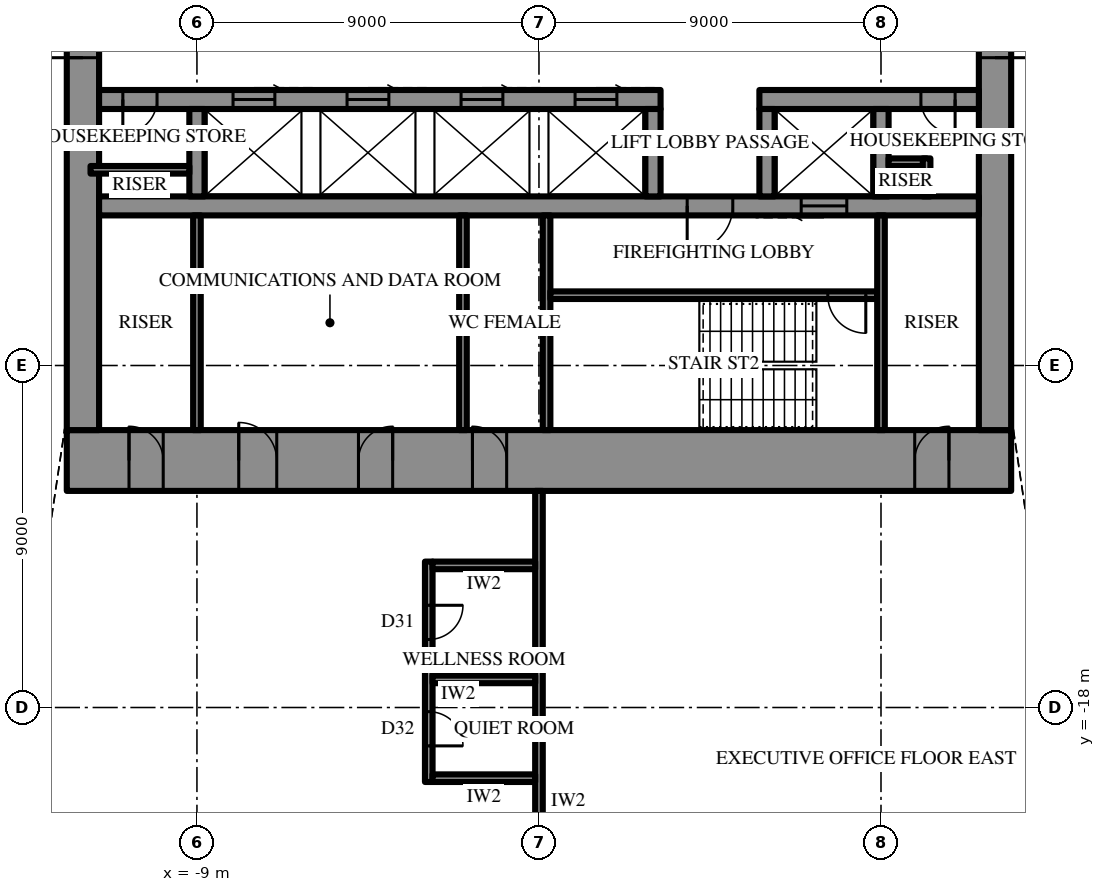
"""IFC4 building model, lengths in metres.
Left out: names, types, materials, properties, quantities, classifications, styles, units other than length and angle.
Written with IfcOpenShell. Run it as: python <this file> out.ifc"""

import sys

from ifc_helpers import new_model, si_unit, direction, frame, frame_2d, origin, place, context, subcontext, project, spatial, rectangle, extrude, element, fill, save


model = new_model("IFC4")
c1 = context("Model", 3, precision=1e-05, world=origin(), true_north=direction((0.0, 1.0)))
c2 = subcontext(c1, "Body", "Model", "MODEL_VIEW")
j1 = project(units=[si_unit("LENGTHUNIT", "METRE"), si_unit("PLANEANGLEUNIT", "RADIAN")], contexts=[c1])
p1 = place(None, origin())
s1 = spatial("IfcSite", under=j1, at=p1, CompositionType="ELEMENT")
p2 = place(p1, origin())
s2 = spatial("IfcBuilding", under=s1, at=p2, CompositionType="ELEMENT")
p3 = place(p2, frame((0.0, 0.0, 374.5)))
s3 = spatial("IfcBuildingStorey", under=s2, at=p3, CompositionType="ELEMENT", Elevation=374.5)
p4 = place(p3, frame((12.425, -11.5, 0.0), z_axis=(0.0, 0.0, 1.0), x_axis=(-1.0, 0.0, 0.0)))
e1 = element("IfcWall", 1, at=p4, inside=s3, PredefinedType="SHEAR", context=c2, shape_type="SweptSolid", body=[
    extrude(rectangle(XDim=24.85, YDim=1.6, at=frame_2d((12.425, 0.0))), origin(), (0.0, 0.0, 1.0), 4.2),
])
p5 = place(p4, frame((13.275, 0.0, 0.0)))
e2 = element("IfcOpeningElement", 2, at=p5, cuts=e1, PredefinedType="OPENING", context=c2, shape_type="SweptSolid", body=[
    extrude(rectangle(XDim=0.9, YDim=2.2, at=frame_2d((0.45, 1.1))), frame((0.0, 0.81, 0.0), z_axis=(0.0, -1.0, 0.0), x_axis=(1.0, 0.0, 0.0)), (0.0, 0.0, 1.0), 1.62),
])
p6 = place(p4, frame((16.275, 0.0, 0.0)))
e3 = element("IfcOpeningElement", 3, at=p6, cuts=e1, PredefinedType="OPENING", context=c2, shape_type="SweptSolid", body=[
    extrude(rectangle(XDim=0.9, YDim=2.2, at=frame_2d((0.45, 1.1))), frame((0.0, 0.81, 0.0), z_axis=(0.0, -1.0, 0.0), x_axis=(1.0, 0.0, 0.0)), (0.0, 0.0, 1.0), 1.62),
])
p7 = place(p4, frame((19.325, 0.0, 0.0)))
e4 = element("IfcOpeningElement", 4, at=p7, cuts=e1, PredefinedType="OPENING", context=c2, shape_type="SweptSolid", body=[
    extrude(rectangle(XDim=1.0, YDim=2.2, at=frame_2d((0.5, 1.1))), frame((0.0, 0.81, 0.0), z_axis=(0.0, -1.0, 0.0), x_axis=(1.0, 0.0, 0.0)), (0.0, 0.0, 1.0), 1.62),
])
p8 = place(p4, frame((1.637, 0.0, 0.0)))
e5 = element("IfcOpeningElement", 5, at=p8, cuts=e1, PredefinedType="OPENING", context=c2, shape_type="SweptSolid", body=[
    extrude(rectangle(XDim=0.9, YDim=2.2, at=frame_2d((0.45, 1.1))), frame((0.0, 0.81, 0.0), z_axis=(0.0, -1.0, 0.0), x_axis=(1.0, 0.0, 0.0)), (0.0, 0.0, 1.0), 1.62),
])
p9 = place(p4, frame((22.312, 0.0, 0.0)))
e6 = element("IfcOpeningElement", 6, at=p9, cuts=e1, PredefinedType="OPENING", context=c2, shape_type="SweptSolid", body=[
    extrude(rectangle(XDim=0.9, YDim=2.2, at=frame_2d((0.45, 1.1))), frame((0.0, 0.81, 0.0), z_axis=(0.0, -1.0, 0.0), x_axis=(1.0, 0.0, 0.0)), (0.0, 0.0, 1.0), 1.62),
])
p10 = place(p3, frame((12.0, -10.7, 0.0), z_axis=(0.0, 0.0, 1.0), x_axis=(0.0, 1.0, 0.0)))
e7 = element("IfcWall", 7, at=p10, inside=s3, PredefinedType="SHEAR", context=c2, shape_type="SweptSolid", body=[
    extrude(rectangle(XDim=21.4, YDim=0.85, at=frame_2d((10.7, 0.0))), origin(), (0.0, 0.0, 1.0), 4.2),
])
p11 = place(p10, frame((9.8, 0.0, 0.0)))
e8 = element("IfcOpeningElement", 8, at=p11, cuts=e7, PredefinedType="OPENING", context=c2, shape_type="SweptSolid", body=[
    extrude(rectangle(XDim=1.8, YDim=2.4, at=frame_2d((0.9, 1.2))), frame((0.0, 0.435, 0.0), z_axis=(0.0, -1.0, 0.0), x_axis=(1.0, 0.0, 0.0)), (0.0, 0.0, 1.0), 0.87),
])
p12 = place(p3, frame((-12.0, 10.7, 0.0), z_axis=(0.0, 0.0, 1.0), x_axis=(0.0, -1.0, 0.0)))
e9 = element("IfcWall", 9, at=p12, inside=s3, PredefinedType="SHEAR", context=c2, shape_type="SweptSolid", body=[
    extrude(rectangle(XDim=21.4, YDim=0.85, at=frame_2d((10.7, 0.0))), origin(), (0.0, 0.0, 1.0), 4.2),
])
p13 = place(p12, frame((9.8, 0.0, 0.0)))
e10 = element("IfcOpeningElement", 10, at=p13, cuts=e9, PredefinedType="OPENING", context=c2, shape_type="SweptSolid", body=[
    extrude(rectangle(XDim=1.8, YDim=2.4, at=frame_2d((0.9, 1.2))), frame((0.0, 0.435, 0.0), z_axis=(0.0, -1.0, 0.0), x_axis=(1.0, 0.0, 0.0)), (0.0, 0.0, 1.0), 0.87),
])
p14 = place(p3, frame((11.575, -2.0, 0.0), z_axis=(0.0, 0.0, 1.0), x_axis=(-1.0, 0.0, 0.0)))
e11 = element("IfcWall", 11, at=p14, inside=s3, PredefinedType="SHEAR", context=c2, shape_type="SweptSolid", body=[
    extrude(rectangle(XDim=5.775, YDim=0.5, at=frame_2d((2.887, 0.0))), origin(), (0.0, 0.0, 1.0), 4.2),
])
p15 = place(p14, frame((0.625, 0.0, 0.0)))
e12 = element("IfcOpeningElement", 12, at=p15, cuts=e11, PredefinedType="OPENING", context=c2, shape_type="SweptSolid", body=[
    extrude(rectangle(XDim=0.9, YDim=2.2, at=frame_2d((0.45, 1.1))), frame((0.0, 0.26, 0.0), z_axis=(0.0, -1.0, 0.0), x_axis=(1.0, 0.0, 0.0)), (0.0, 0.0, 1.0), 0.52),
])
p16 = place(p3, frame((3.2, -2.0, 0.0), z_axis=(0.0, 0.0, 1.0), x_axis=(-1.0, 0.0, 0.0)))
e13 = element("IfcWall", 13, at=p16, inside=s3, PredefinedType="SHEAR", context=c2, shape_type="SweptSolid", body=[
    extrude(rectangle(XDim=14.775, YDim=0.5, at=frame_2d((7.387, 0.0))), origin(), (0.0, 0.0, 1.0), 4.2),
])
p17 = place(p16, frame((13.25, 0.0, 0.0)))
e14 = element("IfcOpeningElement", 14, at=p17, cuts=e13, PredefinedType="OPENING", context=c2, shape_type="SweptSolid", body=[
    extrude(rectangle(XDim=0.9, YDim=2.2, at=frame_2d((0.45, 1.1))), frame((0.0, 0.26, 0.0), z_axis=(0.0, -1.0, 0.0), x_axis=(1.0, 0.0, 0.0)), (0.0, 0.0, 1.0), 0.52),
])
p18 = place(p16, frame((1.15, 0.0, 0.0)))
e15 = element("IfcOpeningElement", 15, at=p18, cuts=e13, PredefinedType="OPENING", context=c2, shape_type="SweptSolid", body=[
    extrude(rectangle(XDim=1.1, YDim=2.2, at=frame_2d((0.55, 1.1))), frame((0.0, 0.26, 0.0), z_axis=(0.0, -1.0, 0.0), x_axis=(1.0, 0.0, 0.0)), (0.0, 0.0, 1.0), 0.52),
])
p19 = place(p16, frame((4.15, 0.0, 0.0)))
e16 = element("IfcOpeningElement", 16, at=p19, cuts=e13, PredefinedType="OPENING", context=c2, shape_type="SweptSolid", body=[
    extrude(rectangle(XDim=1.1, YDim=2.2, at=frame_2d((0.55, 1.1))), frame((0.0, 0.26, 0.0), z_axis=(0.0, -1.0, 0.0), x_axis=(1.0, 0.0, 0.0)), (0.0, 0.0, 1.0), 0.52),
])
p20 = place(p16, frame((7.15, 0.0, 0.0)))
e17 = element("IfcOpeningElement", 17, at=p20, cuts=e13, PredefinedType="OPENING", context=c2, shape_type="SweptSolid", body=[
    extrude(rectangle(XDim=1.1, YDim=2.2, at=frame_2d((0.55, 1.1))), frame((0.0, 0.26, 0.0), z_axis=(0.0, -1.0, 0.0), x_axis=(1.0, 0.0, 0.0)), (0.0, 0.0, 1.0), 0.52),
])
p21 = place(p16, frame((10.15, 0.0, 0.0)))
e18 = element("IfcOpeningElement", 18, at=p21, cuts=e13, PredefinedType="OPENING", context=c2, shape_type="SweptSolid", body=[
    extrude(rectangle(XDim=1.1, YDim=2.2, at=frame_2d((0.55, 1.1))), frame((0.0, 0.26, 0.0), z_axis=(0.0, -1.0, 0.0), x_axis=(1.0, 0.0, 0.0)), (0.0, 0.0, 1.0), 0.52),
])
p22 = place(p3, frame((11.575, -4.8, 0.0), z_axis=(0.0, 0.0, 1.0), x_axis=(-1.0, 0.0, 0.0)))
e19 = element("IfcWall", 19, at=p22, inside=s3, PredefinedType="SHEAR", context=c2, shape_type="SweptSolid", body=[
    extrude(rectangle(XDim=23.15, YDim=0.5, at=frame_2d((11.575, 0.0))), origin(), (0.0, 0.0, 1.0), 4.2),
])
p23 = place(p22, frame((6.475, 0.0, 0.0)))
e20 = element("IfcOpeningElement", 20, at=p23, cuts=e19, PredefinedType="OPENING", context=c2, shape_type="SweptSolid", body=[
    extrude(rectangle(XDim=1.2, YDim=2.2, at=frame_2d((0.6, 1.1))), frame((0.0, 0.26, 0.0), z_axis=(0.0, -1.0, 0.0), x_axis=(1.0, 0.0, 0.0)), (0.0, 0.0, 1.0), 0.52),
])
p24 = place(p22, frame((3.475, 0.0, 0.0)))
e21 = element("IfcOpeningElement", 21, at=p24, cuts=e19, PredefinedType="OPENING", context=c2, shape_type="SweptSolid", body=[
    extrude(rectangle(XDim=1.2, YDim=2.2, at=frame_2d((0.6, 1.1))), frame((0.0, 0.26, 0.0), z_axis=(0.0, -1.0, 0.0), x_axis=(1.0, 0.0, 0.0)), (0.0, 0.0, 1.0), 0.52),
])
for number, where, z_axis, x_axis in (
    (22, (9.0, -2.25, 0.0), (0.0, 0.0, 1.0), (0.0, -1.0, 0.0)),
    (23, (6.0, -2.25, 0.0), (0.0, 0.0, 1.0), (0.0, -1.0, 0.0)),
    (24, (3.0, -2.25, 0.0), (0.0, 0.0, 1.0), (0.0, -1.0, 0.0)),
    (25, (-9.0, -2.25, 0.0), (0.0, 0.0, 1.0), (0.0, -1.0, 0.0)),
):
    element("IfcWall", number, at=place(p3, frame(where, z_axis=z_axis, x_axis=x_axis)), inside=s3, PredefinedType="SHEAR", context=c2, shape_type="SweptSolid", body=[
        extrude(rectangle(XDim=2.3, YDim=0.4, at=frame_2d((1.15, 0.0))), origin(), (0.0, 0.0, 1.0), 4.2),
    ])
p25 = place(p3, frame((0.2, -5.05, 0.0), z_axis=(0.0, 0.0, 1.0), x_axis=(0.0, -1.0, 0.0)))
e26 = element("IfcWall", 26, at=p25, inside=s3, PredefinedType="SHEAR", context=c2, shape_type="SweptSolid", body=[
    extrude(rectangle(XDim=5.65, YDim=0.2, at=frame_2d((2.825, 0.0))), origin(), (0.0, 0.0, 1.0), 4.2),
])
p26 = place(p3, frame((8.9, -7.15, 0.0), z_axis=(0.0, 0.0, 1.0), x_axis=(-1.0, 0.0, 0.0)))
e27 = element("IfcWall", 27, at=p26, inside=s3, PredefinedType="SHEAR", context=c2, shape_type="SweptSolid", body=[
    extrude(rectangle(XDim=8.6, YDim=0.2, at=frame_2d((4.3, 0.0))), origin(), (0.0, 0.0, 1.0), 4.2),
])
p27 = place(p26, frame((0.3, 0.0, 0.0)))
e28 = element("IfcOpeningElement", 28, at=p27, cuts=e27, PredefinedType="OPENING", context=c2, shape_type="SweptSolid", body=[
    extrude(rectangle(XDim=1.0, YDim=2.2, at=frame_2d((0.5, 1.1))), frame((0.0, 0.11, 0.0), z_axis=(0.0, -1.0, 0.0), x_axis=(1.0, 0.0, 0.0)), (0.0, 0.0, 1.0), 0.22),
])
for number, where, z_axis, x_axis in (
    (29, (9.0, -5.05, 0.0), (0.0, 0.0, 1.0), (0.0, -1.0, 0.0)),
    (30, (-9.0, -5.05, 0.0), (0.0, 0.0, 1.0), (0.0, -1.0, 0.0)),
    (31, (-2.0, -5.05, 0.0), (0.0, 0.0, 1.0), (0.0, -1.0, 0.0)),
):
    element("IfcWall", number, at=place(p3, frame(where, z_axis=z_axis, x_axis=x_axis)), inside=s3, PredefinedType="PARTITIONING", context=c2, shape_type="SweptSolid", body=[
        extrude(rectangle(XDim=5.65, YDim=0.2, at=frame_2d((2.825, 0.0))), origin(), (0.0, 0.0, 1.0), 4.0),
    ])
for number, where, z_axis, x_axis in (
    (32, (10.2, -3.65, 0.0), (0.0, 0.0, 1.0), (-1.0, 0.0, 0.0)),
    (33, (10.2, -3.55, 0.0), (0.0, 0.0, 1.0), (0.0, -1.0, 0.0)),
):
    element("IfcWall", number, at=place(p3, frame(where, z_axis=z_axis, x_axis=x_axis)), inside=s3, PredefinedType="PARTITIONING", context=c2, shape_type="SweptSolid", body=[
        extrude(rectangle(XDim=1.0, YDim=0.2, at=frame_2d((0.5, 0.0))), origin(), (0.0, 0.0, 1.0), 4.0),
    ])
p28 = place(p3, frame((-9.2, -3.85, 0.0), z_axis=(0.0, 0.0, 1.0), x_axis=(-1.0, 0.0, 0.0)))
e34 = element("IfcWall", 34, at=p28, inside=s3, PredefinedType="PARTITIONING", context=c2, shape_type="SweptSolid", body=[
    extrude(rectangle(XDim=2.6, YDim=0.2, at=frame_2d((1.3, 0.0))), origin(), (0.0, 0.0, 1.0), 4.0),
])
p29 = place(p3, frame((0.0, -12.3, 0.0), z_axis=(0.0, 0.0, 1.0), x_axis=(0.0, -1.0, 0.0)))
e35 = element("IfcWall", 35, at=p29, inside=s3, PredefinedType="PARTITIONING", context=c2, shape_type="SweptSolid", body=[
    extrude(rectangle(XDim=13.6, YDim=0.2, at=frame_2d((6.8, 0.0))), origin(), (0.0, 0.0, 1.0), 2.992),
])
p30 = place(p3, frame((-2.9, -14.16, 0.0), z_axis=(0.0, 0.0, 1.0), x_axis=(0.0, -1.0, 0.0)))
e36 = element("IfcWall", 36, at=p30, inside=s3, PredefinedType="PARTITIONING", context=c2, shape_type="SweptSolid", body=[
    extrude(rectangle(XDim=5.8, YDim=0.2, at=frame_2d((2.9, 0.0))), origin(), (0.0, 0.0, 1.0), 4.0),
])
p31 = place(p30, frame((1.15, 0.0, 0.0)))
e37 = element("IfcOpeningElement", 37, at=p31, cuts=e36, PredefinedType="OPENING", context=c2, shape_type="SweptSolid", body=[
    extrude(rectangle(XDim=0.9, YDim=2.2, at=frame_2d((0.45, 1.1))), frame((0.0, 0.11, 0.0), z_axis=(0.0, -1.0, 0.0), x_axis=(1.0, 0.0, 0.0)), (0.0, 0.0, 1.0), 0.22),
])
p32 = place(p30, frame((3.95, 0.0, 0.0)))
e38 = element("IfcOpeningElement", 38, at=p32, cuts=e36, PredefinedType="OPENING", context=c2, shape_type="SweptSolid", body=[
    extrude(rectangle(XDim=0.9, YDim=2.2, at=frame_2d((0.45, 1.1))), frame((0.0, 0.11, 0.0), z_axis=(0.0, -1.0, 0.0), x_axis=(1.0, 0.0, 0.0)), (0.0, 0.0, 1.0), 0.22),
])
for number, where, z_axis, x_axis in (
    (39, (-0.1, -14.26, 0.0), (0.0, 0.0, 1.0), (-1.0, 0.0, 0.0)),
    (40, (-0.1, -17.26, 0.0), (0.0, 0.0, 1.0), (-1.0, 0.0, 0.0)),
    (41, (-0.1, -19.86, 0.0), (0.0, 0.0, 1.0), (-1.0, 0.0, 0.0)),
):
    element("IfcWall", number, at=place(p3, frame(where, z_axis=z_axis, x_axis=x_axis)), inside=s3, PredefinedType="PARTITIONING", context=c2, shape_type="SweptSolid", body=[
        extrude(rectangle(XDim=2.7, YDim=0.2, at=frame_2d((1.35, 0.0))), origin(), (0.0, 0.0, 1.0), 4.0),
    ])
p33 = place(p11, frame((1.8, 0.0, 0.0), z_axis=(0.0, 0.0, 1.0), x_axis=(-1.0, 0.0, 0.0)))
e42 = element("IfcDoor", 42, at=p33, inside=s3, OperationType="DOUBLE_DOOR_SINGLE_SWING", PredefinedType="DOOR", context=c2, shape_type="SweptSolid", body=[
    extrude(rectangle(XDim=1.8, YDim=2.4, at=frame_2d((0.9, 1.2))), frame((0.0, 0.025, 0.0), z_axis=(0.0, -1.0, 0.0), x_axis=(1.0, 0.0, 0.0)), (0.0, 0.0, 1.0), 0.05),
])
fill(e8, e42)
p34 = place(p13, frame((1.8, 0.0, 0.0), z_axis=(0.0, 0.0, 1.0), x_axis=(-1.0, 0.0, 0.0)))
e43 = element("IfcDoor", 43, at=p34, inside=s3, OperationType="DOUBLE_DOOR_SINGLE_SWING", PredefinedType="DOOR", context=c2, shape_type="SweptSolid", body=[
    extrude(rectangle(XDim=1.8, YDim=2.4, at=frame_2d((0.9, 1.2))), frame((0.0, 0.025, 0.0), z_axis=(0.0, -1.0, 0.0), x_axis=(1.0, 0.0, 0.0)), (0.0, 0.0, 1.0), 0.05),
])
fill(e10, e43)
p35 = place(p23, origin())
e44 = element("IfcDoor", 44, at=p35, inside=s3, OperationType="SINGLE_SWING_LEFT", PredefinedType="DOOR", context=c2, shape_type="SweptSolid", body=[
    extrude(rectangle(XDim=1.2, YDim=2.2, at=frame_2d((0.6, 1.1))), frame((0.0, 0.025, 0.0), z_axis=(0.0, -1.0, 0.0), x_axis=(1.0, 0.0, 0.0)), (0.0, 0.0, 1.0), 0.05),
])
fill(e20, e44)
p36 = place(p27, origin())
e45 = element("IfcDoor", 45, at=p36, inside=s3, OperationType="SINGLE_SWING_RIGHT", PredefinedType="DOOR", context=c2, shape_type="SweptSolid", body=[
    extrude(rectangle(XDim=1.0, YDim=2.2, at=frame_2d((0.5, 1.1))), frame((0.0, 0.025, 0.0), z_axis=(0.0, -1.0, 0.0), x_axis=(1.0, 0.0, 0.0)), (0.0, 0.0, 1.0), 0.05),
])
fill(e28, e45)
p37 = place(p5, frame((0.9, 0.0, 0.0), z_axis=(0.0, 0.0, 1.0), x_axis=(-1.0, 0.0, 0.0)))
e46 = element("IfcDoor", 46, at=p37, inside=s3, OperationType="SINGLE_SWING_RIGHT", PredefinedType="DOOR", context=c2, shape_type="SweptSolid", body=[
    extrude(rectangle(XDim=0.9, YDim=2.2, at=frame_2d((0.45, 1.1))), frame((0.0, 0.025, 0.0), z_axis=(0.0, -1.0, 0.0), x_axis=(1.0, 0.0, 0.0)), (0.0, 0.0, 1.0), 0.05),
])
fill(e2, e46)
p38 = place(p6, frame((0.9, 0.0, 0.0), z_axis=(0.0, 0.0, 1.0), x_axis=(-1.0, 0.0, 0.0)))
e47 = element("IfcDoor", 47, at=p38, inside=s3, OperationType="SINGLE_SWING_LEFT", PredefinedType="DOOR", context=c2, shape_type="SweptSolid", body=[
    extrude(rectangle(XDim=0.9, YDim=2.2, at=frame_2d((0.45, 1.1))), frame((0.0, 0.025, 0.0), z_axis=(0.0, -1.0, 0.0), x_axis=(1.0, 0.0, 0.0)), (0.0, 0.0, 1.0), 0.05),
])
fill(e3, e47)
p39 = place(p7, frame((1.0, 0.0, 0.0), z_axis=(0.0, 0.0, 1.0), x_axis=(-1.0, 0.0, 0.0)))
e48 = element("IfcDoor", 48, at=p39, inside=s3, OperationType="SINGLE_SWING_RIGHT", PredefinedType="DOOR", context=c2, shape_type="SweptSolid", body=[
    extrude(rectangle(XDim=1.0, YDim=2.2, at=frame_2d((0.5, 1.1))), frame((0.0, 0.025, 0.0), z_axis=(0.0, -1.0, 0.0), x_axis=(1.0, 0.0, 0.0)), (0.0, 0.0, 1.0), 0.05),
])
fill(e4, e48)
p40 = place(p8, frame((0.9, 0.0, 0.0), z_axis=(0.0, 0.0, 1.0), x_axis=(-1.0, 0.0, 0.0)))
e49 = element("IfcDoor", 49, at=p40, inside=s3, OperationType="SINGLE_SWING_LEFT", PredefinedType="DOOR", context=c2, shape_type="SweptSolid", body=[
    extrude(rectangle(XDim=0.9, YDim=2.2, at=frame_2d((0.45, 1.1))), frame((0.0, 0.025, 0.0), z_axis=(0.0, -1.0, 0.0), x_axis=(1.0, 0.0, 0.0)), (0.0, 0.0, 1.0), 0.05),
])
fill(e5, e49)
p41 = place(p9, frame((0.9, 0.0, 0.0), z_axis=(0.0, 0.0, 1.0), x_axis=(-1.0, 0.0, 0.0)))
e50 = element("IfcDoor", 50, at=p41, inside=s3, OperationType="SINGLE_SWING_RIGHT", PredefinedType="DOOR", context=c2, shape_type="SweptSolid", body=[
    extrude(rectangle(XDim=0.9, YDim=2.2, at=frame_2d((0.45, 1.1))), frame((0.0, 0.025, 0.0), z_axis=(0.0, -1.0, 0.0), x_axis=(1.0, 0.0, 0.0)), (0.0, 0.0, 1.0), 0.05),
])
fill(e6, e50)
p42 = place(p15, origin())
e51 = element("IfcDoor", 51, at=p42, inside=s3, OperationType="SINGLE_SWING_RIGHT", PredefinedType="DOOR", context=c2, shape_type="SweptSolid", body=[
    extrude(rectangle(XDim=0.9, YDim=2.2, at=frame_2d((0.45, 1.1))), frame((0.0, 0.025, 0.0), z_axis=(0.0, -1.0, 0.0), x_axis=(1.0, 0.0, 0.0)), (0.0, 0.0, 1.0), 0.05),
])
fill(e12, e51)
p43 = place(p17, origin())
e52 = element("IfcDoor", 52, at=p43, inside=s3, OperationType="SINGLE_SWING_LEFT", PredefinedType="DOOR", context=c2, shape_type="SweptSolid", body=[
    extrude(rectangle(XDim=0.9, YDim=2.2, at=frame_2d((0.45, 1.1))), frame((0.0, 0.025, 0.0), z_axis=(0.0, -1.0, 0.0), x_axis=(1.0, 0.0, 0.0)), (0.0, 0.0, 1.0), 0.05),
])
fill(e14, e52)
p44 = place(p24, origin())
e53 = element("IfcDoor", 53, at=p44, inside=s3, OperationType="SLIDING_TO_LEFT", PredefinedType="DOOR", context=c2, shape_type="SweptSolid", body=[
    extrude(rectangle(XDim=1.2, YDim=2.2, at=frame_2d((0.6, 1.1))), frame((0.0, 0.025, 0.0), z_axis=(0.0, -1.0, 0.0), x_axis=(1.0, 0.0, 0.0)), (0.0, 0.0, 1.0), 0.05),
])
fill(e21, e53)
p45 = place(p18, frame((1.1, 0.0, 0.0), z_axis=(0.0, 0.0, 1.0), x_axis=(-1.0, 0.0, 0.0)))
e54 = element("IfcDoor", 54, at=p45, inside=s3, OperationType="SLIDING_TO_LEFT", PredefinedType="DOOR", context=c2, shape_type="SweptSolid", body=[
    extrude(rectangle(XDim=1.1, YDim=2.2, at=frame_2d((0.55, 1.1))), frame((0.0, 0.025, 0.0), z_axis=(0.0, -1.0, 0.0), x_axis=(1.0, 0.0, 0.0)), (0.0, 0.0, 1.0), 0.05),
])
fill(e15, e54)
p46 = place(p19, frame((1.1, 0.0, 0.0), z_axis=(0.0, 0.0, 1.0), x_axis=(-1.0, 0.0, 0.0)))
e55 = element("IfcDoor", 55, at=p46, inside=s3, OperationType="SLIDING_TO_LEFT", PredefinedType="DOOR", context=c2, shape_type="SweptSolid", body=[
    extrude(rectangle(XDim=1.1, YDim=2.2, at=frame_2d((0.55, 1.1))), frame((0.0, 0.025, 0.0), z_axis=(0.0, -1.0, 0.0), x_axis=(1.0, 0.0, 0.0)), (0.0, 0.0, 1.0), 0.05),
])
fill(e16, e55)
p47 = place(p20, frame((1.1, 0.0, 0.0), z_axis=(0.0, 0.0, 1.0), x_axis=(-1.0, 0.0, 0.0)))
e56 = element("IfcDoor", 56, at=p47, inside=s3, OperationType="SLIDING_TO_LEFT", PredefinedType="DOOR", context=c2, shape_type="SweptSolid", body=[
    extrude(rectangle(XDim=1.1, YDim=2.2, at=frame_2d((0.55, 1.1))), frame((0.0, 0.025, 0.0), z_axis=(0.0, -1.0, 0.0), x_axis=(1.0, 0.0, 0.0)), (0.0, 0.0, 1.0), 0.05),
])
fill(e17, e56)
p48 = place(p21, frame((1.1, 0.0, 0.0), z_axis=(0.0, 0.0, 1.0), x_axis=(-1.0, 0.0, 0.0)))
e57 = element("IfcDoor", 57, at=p48, inside=s3, OperationType="SLIDING_TO_LEFT", PredefinedType="DOOR", context=c2, shape_type="SweptSolid", body=[
    extrude(rectangle(XDim=1.1, YDim=2.2, at=frame_2d((0.55, 1.1))), frame((0.0, 0.025, 0.0), z_axis=(0.0, -1.0, 0.0), x_axis=(1.0, 0.0, 0.0)), (0.0, 0.0, 1.0), 0.05),
])
fill(e18, e57)
p49 = place(p31, origin())
e58 = element("IfcDoor", 58, at=p49, inside=s3, OperationType="SINGLE_SWING_RIGHT", PredefinedType="DOOR", context=c2, shape_type="SweptSolid", body=[
    extrude(rectangle(XDim=0.9, YDim=2.2, at=frame_2d((0.45, 1.1))), frame((0.0, 0.025, 0.0), z_axis=(0.0, -1.0, 0.0), x_axis=(1.0, 0.0, 0.0)), (0.0, 0.0, 1.0), 0.05),
])
fill(e37, e58)
p50 = place(p32, origin())
e59 = element("IfcDoor", 59, at=p50, inside=s3, OperationType="SINGLE_SWING_LEFT", PredefinedType="DOOR", context=c2, shape_type="SweptSolid", body=[
    extrude(rectangle(XDim=0.9, YDim=2.2, at=frame_2d((0.45, 1.1))), frame((0.0, 0.025, 0.0), z_axis=(0.0, -1.0, 0.0), x_axis=(1.0, 0.0, 0.0)), (0.0, 0.0, 1.0), 0.05),
])
fill(e38, e59)
save(model, sys.argv[1])
